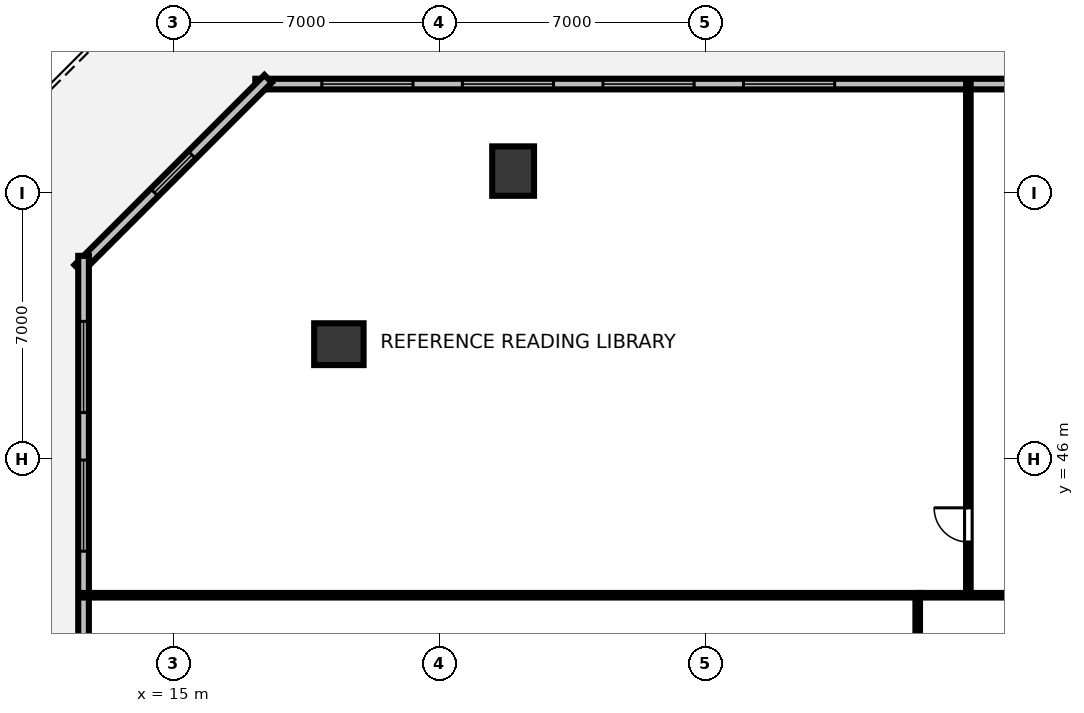
"""IFC4 building model, lengths in metres.
Left out: names, types, materials, properties, quantities, classifications, styles, units other than length and angle.
Written with IfcOpenShell. Run it as: python <this file> out.ifc"""

import sys

from ifc_helpers import new_model, si_unit, direction, frame, frame_2d, origin, origin_2d, place, context, subcontext, project, spatial, rectangle, hollow_rectangle, extrude, element, fill, save


model = new_model("IFC4")
c1 = context("Model", 3, precision=1e-05, world=origin(), true_north=direction((0.0, 1.0)))
c2 = subcontext(c1, "Body", "Model", "MODEL_VIEW")
j1 = project(units=[si_unit("LENGTHUNIT", "METRE"), si_unit("PLANEANGLEUNIT", "RADIAN")], contexts=[c1])
p1 = place(None, origin())
s1 = spatial("IfcSite", under=j1, at=p1, CompositionType="ELEMENT")
p2 = place(p1, origin())
s2 = spatial("IfcBuilding", under=s1, at=p2, CompositionType="ELEMENT")
p3 = place(p2, frame((0.0, 0.0, 14.0)))
s3 = spatial("IfcBuildingStorey", under=s2, at=p3, CompositionType="ELEMENT", Elevation=14.0)
for number, where, z_axis, x_axis in (
    (1, (23.943, 53.571, 0.0), (0.0, 0.0, 1.0), (1.0, 0.0, 0.0)),
    (2, (19.358, 49.016, 0.0), (0.0, 0.0, 1.0), (0.0, 1.0, 0.0)),
):
    element("IfcColumn", number, at=place(p3, frame(where, z_axis=z_axis, x_axis=x_axis)), inside=s3, PredefinedType="COLUMN", context=c2, shape_type="SweptSolid", body=[
        extrude(hollow_rectangle(XDim=1.1, YDim=1.3, WallThickness=0.07, at=origin_2d()), origin(), (0.0, 0.0, 1.0), 4.208),
    ])
p4 = place(p3, frame((74.84, 55.86, 0.0), z_axis=(0.0, 0.0, 1.0), x_axis=(-1.0, 0.0, 0.0)))
e3 = element("IfcWall", 3, at=p4, inside=s3, PredefinedType="STANDARD", context=c2, shape_type="SweptSolid", body=[
    extrude(rectangle(XDim=57.68, YDim=0.28, at=frame_2d((28.84, 0.0))), origin(), (0.0, 0.0, 1.0), 4.21),
])
p5 = place(p4, frame((1.749, 0.0, 0.85)))
e4 = element("IfcOpeningElement", 4, at=p5, cuts=e3, PredefinedType="OPENING", context=c2, shape_type="SweptSolid", body=[
    extrude(rectangle(XDim=2.4, YDim=2.4, at=frame_2d((1.2, 1.2))), frame((0.0, 0.15, 0.0), z_axis=(0.0, -1.0, 0.0), x_axis=(1.0, 0.0, 0.0)), (0.0, 0.0, 1.0), 0.3),
])
p6 = place(p4, frame((5.448, 0.0, 0.85)))
e5 = element("IfcOpeningElement", 5, at=p6, cuts=e3, PredefinedType="OPENING", context=c2, shape_type="SweptSolid", body=[
    extrude(rectangle(XDim=2.4, YDim=2.4, at=frame_2d((1.2, 1.2))), frame((0.0, 0.15, 0.0), z_axis=(0.0, -1.0, 0.0), x_axis=(1.0, 0.0, 0.0)), (0.0, 0.0, 1.0), 0.3),
])
p7 = place(p4, frame((9.147, 0.0, 0.85)))
e6 = element("IfcOpeningElement", 6, at=p7, cuts=e3, PredefinedType="OPENING", context=c2, shape_type="SweptSolid", body=[
    extrude(rectangle(XDim=2.4, YDim=2.4, at=frame_2d((1.2, 1.2))), frame((0.0, 0.15, 0.0), z_axis=(0.0, -1.0, 0.0), x_axis=(1.0, 0.0, 0.0)), (0.0, 0.0, 1.0), 0.3),
])
p8 = place(p4, frame((12.845, 0.0, 0.85)))
e7 = element("IfcOpeningElement", 7, at=p8, cuts=e3, PredefinedType="OPENING", context=c2, shape_type="SweptSolid", body=[
    extrude(rectangle(XDim=2.4, YDim=2.4, at=frame_2d((1.2, 1.2))), frame((0.0, 0.15, 0.0), z_axis=(0.0, -1.0, 0.0), x_axis=(1.0, 0.0, 0.0)), (0.0, 0.0, 1.0), 0.3),
])
p9 = place(p4, frame((16.544, 0.0, 0.85)))
e8 = element("IfcOpeningElement", 8, at=p9, cuts=e3, PredefinedType="OPENING", context=c2, shape_type="SweptSolid", body=[
    extrude(rectangle(XDim=2.4, YDim=2.4, at=frame_2d((1.2, 1.2))), frame((0.0, 0.15, 0.0), z_axis=(0.0, -1.0, 0.0), x_axis=(1.0, 0.0, 0.0)), (0.0, 0.0, 1.0), 0.3),
])
p10 = place(p4, frame((20.243, 0.0, 0.85)))
e9 = element("IfcOpeningElement", 9, at=p10, cuts=e3, PredefinedType="OPENING", context=c2, shape_type="SweptSolid", body=[
    extrude(rectangle(XDim=2.4, YDim=2.4, at=frame_2d((1.2, 1.2))), frame((0.0, 0.15, 0.0), z_axis=(0.0, -1.0, 0.0), x_axis=(1.0, 0.0, 0.0)), (0.0, 0.0, 1.0), 0.3),
])
p11 = place(p4, frame((23.941, 0.0, 0.85)))
e10 = element("IfcOpeningElement", 10, at=p11, cuts=e3, PredefinedType="OPENING", context=c2, shape_type="SweptSolid", body=[
    extrude(rectangle(XDim=2.4, YDim=2.4, at=frame_2d((1.2, 1.2))), frame((0.0, 0.15, 0.0), z_axis=(0.0, -1.0, 0.0), x_axis=(1.0, 0.0, 0.0)), (0.0, 0.0, 1.0), 0.3),
])
p12 = place(p4, frame((27.64, 0.0, 0.85)))
e11 = element("IfcOpeningElement", 11, at=p12, cuts=e3, PredefinedType="OPENING", context=c2, shape_type="SweptSolid", body=[
    extrude(rectangle(XDim=2.4, YDim=2.4, at=frame_2d((1.2, 1.2))), frame((0.0, 0.15, 0.0), z_axis=(0.0, -1.0, 0.0), x_axis=(1.0, 0.0, 0.0)), (0.0, 0.0, 1.0), 0.3),
])
p13 = place(p4, frame((31.339, 0.0, 0.85)))
e12 = element("IfcOpeningElement", 12, at=p13, cuts=e3, PredefinedType="OPENING", context=c2, shape_type="SweptSolid", body=[
    extrude(rectangle(XDim=2.4, YDim=2.4, at=frame_2d((1.2, 1.2))), frame((0.0, 0.15, 0.0), z_axis=(0.0, -1.0, 0.0), x_axis=(1.0, 0.0, 0.0)), (0.0, 0.0, 1.0), 0.3),
])
p14 = place(p4, frame((35.037, 0.0, 0.85)))
e13 = element("IfcOpeningElement", 13, at=p14, cuts=e3, PredefinedType="OPENING", context=c2, shape_type="SweptSolid", body=[
    extrude(rectangle(XDim=2.4, YDim=2.4, at=frame_2d((1.2, 1.2))), frame((0.0, 0.15, 0.0), z_axis=(0.0, -1.0, 0.0), x_axis=(1.0, 0.0, 0.0)), (0.0, 0.0, 1.0), 0.3),
])
p15 = place(p4, frame((42.435, 0.0, 0.85)))
e14 = element("IfcOpeningElement", 14, at=p15, cuts=e3, PredefinedType="OPENING", context=c2, shape_type="SweptSolid", body=[
    extrude(rectangle(XDim=2.4, YDim=2.4, at=frame_2d((1.2, 1.2))), frame((0.0, 0.15, 0.0), z_axis=(0.0, -1.0, 0.0), x_axis=(1.0, 0.0, 0.0)), (0.0, 0.0, 1.0), 0.3),
])
p16 = place(p4, frame((46.133, 0.0, 0.85)))
e15 = element("IfcOpeningElement", 15, at=p16, cuts=e3, PredefinedType="OPENING", context=c2, shape_type="SweptSolid", body=[
    extrude(rectangle(XDim=2.4, YDim=2.4, at=frame_2d((1.2, 1.2))), frame((0.0, 0.15, 0.0), z_axis=(0.0, -1.0, 0.0), x_axis=(1.0, 0.0, 0.0)), (0.0, 0.0, 1.0), 0.3),
])
p17 = place(p4, frame((49.832, 0.0, 0.85)))
e16 = element("IfcOpeningElement", 16, at=p17, cuts=e3, PredefinedType="OPENING", context=c2, shape_type="SweptSolid", body=[
    extrude(rectangle(XDim=2.4, YDim=2.4, at=frame_2d((1.2, 1.2))), frame((0.0, 0.15, 0.0), z_axis=(0.0, -1.0, 0.0), x_axis=(1.0, 0.0, 0.0)), (0.0, 0.0, 1.0), 0.3),
])
p18 = place(p4, frame((53.531, 0.0, 0.85)))
e17 = element("IfcOpeningElement", 17, at=p18, cuts=e3, PredefinedType="OPENING", context=c2, shape_type="SweptSolid", body=[
    extrude(rectangle(XDim=2.4, YDim=2.4, at=frame_2d((1.2, 1.2))), frame((0.0, 0.15, 0.0), z_axis=(0.0, -1.0, 0.0), x_axis=(1.0, 0.0, 0.0)), (0.0, 0.0, 1.0), 0.3),
])
p19 = place(p3, frame((17.498, 56.0, 0.0), z_axis=(0.0, 0.0, 1.0), x_axis=(-0.707106781187, -0.707106781187, 0.0)))
e18 = element("IfcWall", 18, at=p19, inside=s3, PredefinedType="STANDARD", context=c2, shape_type="SweptSolid", body=[
    extrude(rectangle(XDim=7.068, YDim=0.28, at=frame_2d((3.534, 0.0))), origin(), (0.0, 0.0, 1.0), 4.21),
])
p20 = place(p19, frame((2.834, 0.0, 1.5)))
e19 = element("IfcOpeningElement", 19, at=p20, cuts=e18, PredefinedType="OPENING", context=c2, shape_type="SweptSolid", body=[
    extrude(rectangle(XDim=1.4, YDim=1.2, at=frame_2d((0.7, 0.6))), frame((0.0, 0.15, 0.0), z_axis=(0.0, -1.0, 0.0), x_axis=(1.0, 0.0, 0.0)), (0.0, 0.0, 1.0), 0.3),
])
p21 = place(p3, frame((12.64, 51.34, 0.0), z_axis=(0.0, 0.0, 1.0), x_axis=(0.0, -1.0, 0.0)))
e20 = element("IfcWall", 20, at=p21, inside=s3, PredefinedType="STANDARD", context=c2, shape_type="SweptSolid", body=[
    extrude(rectangle(XDim=38.68, YDim=0.28, at=frame_2d((19.34, 0.0))), origin(), (0.0, 0.0, 1.0), 4.21),
])
p22 = place(p21, frame((23.74, 0.0, 0.0)))
e21 = element("IfcOpeningElement", 21, at=p22, cuts=e20, PredefinedType="OPENING", context=c2, shape_type="SweptSolid", body=[
    extrude(rectangle(XDim=1.6, YDim=2.15, at=frame_2d((0.8, 1.075))), frame((0.0, 0.15, 0.0), z_axis=(0.0, -1.0, 0.0), x_axis=(1.0, 0.0, 0.0)), (0.0, 0.0, 1.0), 0.3),
])
p23 = place(p21, frame((1.724, 0.0, 0.85)))
e22 = element("IfcOpeningElement", 22, at=p23, cuts=e20, PredefinedType="OPENING", context=c2, shape_type="SweptSolid", body=[
    extrude(rectangle(XDim=2.4, YDim=2.4, at=frame_2d((1.2, 1.2))), frame((0.0, 0.15, 0.0), z_axis=(0.0, -1.0, 0.0), x_axis=(1.0, 0.0, 0.0)), (0.0, 0.0, 1.0), 0.3),
])
p24 = place(p21, frame((5.372, 0.0, 0.85)))
e23 = element("IfcOpeningElement", 23, at=p24, cuts=e20, PredefinedType="OPENING", context=c2, shape_type="SweptSolid", body=[
    extrude(rectangle(XDim=2.4, YDim=2.4, at=frame_2d((1.2, 1.2))), frame((0.0, 0.15, 0.0), z_axis=(0.0, -1.0, 0.0), x_axis=(1.0, 0.0, 0.0)), (0.0, 0.0, 1.0), 0.3),
])
p25 = place(p21, frame((12.668, 0.0, 0.85)))
e24 = element("IfcOpeningElement", 24, at=p25, cuts=e20, PredefinedType="OPENING", context=c2, shape_type="SweptSolid", body=[
    extrude(rectangle(XDim=2.4, YDim=2.4, at=frame_2d((1.2, 1.2))), frame((0.0, 0.15, 0.0), z_axis=(0.0, -1.0, 0.0), x_axis=(1.0, 0.0, 0.0)), (0.0, 0.0, 1.0), 0.3),
])
p26 = place(p21, frame((16.316, 0.0, 0.85)))
e25 = element("IfcOpeningElement", 25, at=p26, cuts=e20, PredefinedType="OPENING", context=c2, shape_type="SweptSolid", body=[
    extrude(rectangle(XDim=2.4, YDim=2.4, at=frame_2d((1.2, 1.2))), frame((0.0, 0.15, 0.0), z_axis=(0.0, -1.0, 0.0), x_axis=(1.0, 0.0, 0.0)), (0.0, 0.0, 1.0), 0.3),
])
p27 = place(p21, frame((19.964, 0.0, 0.85)))
e26 = element("IfcOpeningElement", 26, at=p27, cuts=e20, PredefinedType="OPENING", context=c2, shape_type="SweptSolid", body=[
    extrude(rectangle(XDim=2.4, YDim=2.4, at=frame_2d((1.2, 1.2))), frame((0.0, 0.15, 0.0), z_axis=(0.0, -1.0, 0.0), x_axis=(1.0, 0.0, 0.0)), (0.0, 0.0, 1.0), 0.3),
])
p28 = place(p21, frame((30.908, 0.0, 0.85)))
e27 = element("IfcOpeningElement", 27, at=p28, cuts=e20, PredefinedType="OPENING", context=c2, shape_type="SweptSolid", body=[
    extrude(rectangle(XDim=2.4, YDim=2.4, at=frame_2d((1.2, 1.2))), frame((0.0, 0.15, 0.0), z_axis=(0.0, -1.0, 0.0), x_axis=(1.0, 0.0, 0.0)), (0.0, 0.0, 1.0), 0.3),
])
p29 = place(p21, frame((34.556, 0.0, 0.85)))
e28 = element("IfcOpeningElement", 28, at=p29, cuts=e20, PredefinedType="OPENING", context=c2, shape_type="SweptSolid", body=[
    extrude(rectangle(XDim=2.4, YDim=2.4, at=frame_2d((1.2, 1.2))), frame((0.0, 0.15, 0.0), z_axis=(0.0, -1.0, 0.0), x_axis=(1.0, 0.0, 0.0)), (0.0, 0.0, 1.0), 0.3),
])
p30 = place(p3, frame((35.923, 42.41, 0.0), z_axis=(0.0, 0.0, 1.0), x_axis=(0.0, 1.0, 0.0)))
e29 = element("IfcWall", 29, at=p30, inside=s3, PredefinedType="PARTITIONING", context=c2, shape_type="SweptSolid", body=[
    extrude(rectangle(XDim=13.45, YDim=0.12, at=frame_2d((6.725, 0.0))), origin(), (0.0, 0.0, 1.0), 3.31),
])
p31 = place(p30, frame((1.4, 0.0, 0.0)))
e30 = element("IfcOpeningElement", 30, at=p31, cuts=e29, PredefinedType="OPENING", context=c2, shape_type="SweptSolid", body=[
    extrude(rectangle(XDim=0.9, YDim=2.15, at=frame_2d((0.45, 1.075))), frame((0.0, 0.07, 0.0), z_axis=(0.0, -1.0, 0.0), x_axis=(1.0, 0.0, 0.0)), (0.0, 0.0, 1.0), 0.14),
])
p32 = place(p3, frame((34.65, 42.41, 0.0), z_axis=(0.0, 0.0, 1.0), x_axis=(1.0, 0.0, 0.0)))
e31 = element("IfcWall", 31, at=p32, inside=s3, PredefinedType="PARTITIONING", context=c2, shape_type="SweptSolid", body=[
    extrude(rectangle(XDim=22.7, YDim=0.12, at=frame_2d((11.35, 0.0))), origin(), (0.0, 0.0, 1.0), 3.31),
])
p33 = place(p32, frame((11.441, 0.0, 0.0)))
e32 = element("IfcOpeningElement", 32, at=p33, cuts=e31, PredefinedType="OPENING", context=c2, shape_type="SweptSolid", body=[
    extrude(rectangle(XDim=0.95, YDim=2.15, at=frame_2d((0.475, 1.075))), frame((0.0, 0.07, 0.0), z_axis=(0.0, -1.0, 0.0), x_axis=(1.0, 0.0, 0.0)), (0.0, 0.0, 1.0), 0.14),
])
p34 = place(p3, frame((34.59, 21.65, 0.0), z_axis=(0.0, 0.0, 1.0), x_axis=(0.0, 1.0, 0.0)))
e33 = element("IfcWall", 33, at=p34, inside=s3, PredefinedType="PARTITIONING", context=c2, shape_type="SweptSolid", body=[
    extrude(rectangle(XDim=20.7, YDim=0.12, at=frame_2d((10.35, 0.0))), origin(), (0.0, 0.0, 1.0), 3.31),
])
p35 = place(p34, frame((9.875, 0.0, 0.0)))
e34 = element("IfcOpeningElement", 34, at=p35, cuts=e33, PredefinedType="OPENING", context=c2, shape_type="SweptSolid", body=[
    extrude(rectangle(XDim=0.95, YDim=2.15, at=frame_2d((0.475, 1.075))), frame((0.0, 0.07, 0.0), z_axis=(0.0, -1.0, 0.0), x_axis=(1.0, 0.0, 0.0)), (0.0, 0.0, 1.0), 0.14),
])
p36 = place(p3, frame((34.65, 42.41, 0.0), z_axis=(0.0, 0.0, 1.0), x_axis=(-1.0, 0.0, 0.0)))
e35 = element("IfcWall", 35, at=p36, inside=s3, PredefinedType="PARTITIONING", context=c2, shape_type="SweptSolid", body=[
    extrude(rectangle(XDim=22.01, YDim=0.12, at=frame_2d((11.005, 0.0))), origin(), (0.0, 0.0, 1.0), 3.31),
])
p37 = place(p15, origin())
e36 = element("IfcWindow", 36, at=p37, inside=s3, PartitioningType="SINGLE_PANEL", PredefinedType="WINDOW", context=c2, shape_type="SweptSolid", body=[
    extrude(rectangle(XDim=2.4, YDim=2.4, at=frame_2d((1.2, 1.2))), frame((0.0, 0.03, 0.0), z_axis=(0.0, -1.0, 0.0), x_axis=(1.0, 0.0, 0.0)), (0.0, 0.0, 1.0), 0.06),
])
fill(e14, e36)
p38 = place(p16, origin())
e37 = element("IfcWindow", 37, at=p38, inside=s3, PartitioningType="SINGLE_PANEL", PredefinedType="WINDOW", context=c2, shape_type="SweptSolid", body=[
    extrude(rectangle(XDim=2.4, YDim=2.4, at=frame_2d((1.2, 1.2))), frame((0.0, 0.03, 0.0), z_axis=(0.0, -1.0, 0.0), x_axis=(1.0, 0.0, 0.0)), (0.0, 0.0, 1.0), 0.06),
])
fill(e15, e37)
p39 = place(p17, origin())
e38 = element("IfcWindow", 38, at=p39, inside=s3, PartitioningType="SINGLE_PANEL", PredefinedType="WINDOW", context=c2, shape_type="SweptSolid", body=[
    extrude(rectangle(XDim=2.4, YDim=2.4, at=frame_2d((1.2, 1.2))), frame((0.0, 0.03, 0.0), z_axis=(0.0, -1.0, 0.0), x_axis=(1.0, 0.0, 0.0)), (0.0, 0.0, 1.0), 0.06),
])
fill(e16, e38)
p40 = place(p18, origin())
e39 = element("IfcWindow", 39, at=p40, inside=s3, PartitioningType="SINGLE_PANEL", PredefinedType="WINDOW", context=c2, shape_type="SweptSolid", body=[
    extrude(rectangle(XDim=2.4, YDim=2.4, at=frame_2d((1.2, 1.2))), frame((0.0, 0.03, 0.0), z_axis=(0.0, -1.0, 0.0), x_axis=(1.0, 0.0, 0.0)), (0.0, 0.0, 1.0), 0.06),
])
fill(e17, e39)
p41 = place(p20, origin())
e40 = element("IfcWindow", 40, at=p41, inside=s3, PartitioningType="SINGLE_PANEL", PredefinedType="WINDOW", context=c2, shape_type="SweptSolid", body=[
    extrude(rectangle(XDim=1.4, YDim=1.2, at=frame_2d((0.7, 0.6))), frame((0.0, 0.03, 0.0), z_axis=(0.0, -1.0, 0.0), x_axis=(1.0, 0.0, 0.0)), (0.0, 0.0, 1.0), 0.06),
])
fill(e19, e40)
p42 = place(p23, origin())
e41 = element("IfcWindow", 41, at=p42, inside=s3, PartitioningType="SINGLE_PANEL", PredefinedType="WINDOW", context=c2, shape_type="SweptSolid", body=[
    extrude(rectangle(XDim=2.4, YDim=2.4, at=frame_2d((1.2, 1.2))), frame((0.0, 0.03, 0.0), z_axis=(0.0, -1.0, 0.0), x_axis=(1.0, 0.0, 0.0)), (0.0, 0.0, 1.0), 0.06),
])
fill(e22, e41)
p43 = place(p24, origin())
e42 = element("IfcWindow", 42, at=p43, inside=s3, PartitioningType="SINGLE_PANEL", PredefinedType="WINDOW", context=c2, shape_type="SweptSolid", body=[
    extrude(rectangle(XDim=2.4, YDim=2.4, at=frame_2d((1.2, 1.2))), frame((0.0, 0.03, 0.0), z_axis=(0.0, -1.0, 0.0), x_axis=(1.0, 0.0, 0.0)), (0.0, 0.0, 1.0), 0.06),
])
fill(e23, e42)
p44 = place(p31, origin())
e43 = element("IfcDoor", 43, at=p44, inside=s3, OperationType="SINGLE_SWING_RIGHT", PredefinedType="DOOR", context=c2, shape_type="SweptSolid", body=[
    extrude(rectangle(XDim=0.9, YDim=2.15, at=frame_2d((0.45, 1.075))), frame((0.0, 0.025, 0.0), z_axis=(0.0, -1.0, 0.0), x_axis=(1.0, 0.0, 0.0)), (0.0, 0.0, 1.0), 0.05),
])
fill(e30, e43)
save(model, sys.argv[1])
